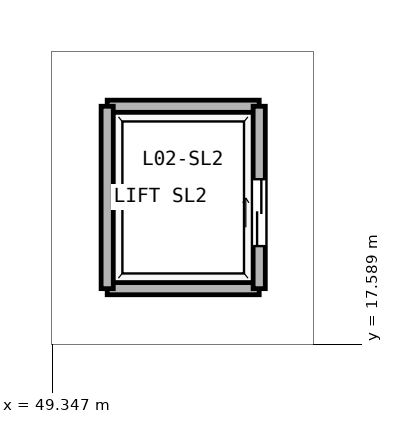
"""IFC4 building model, lengths in metres.
Left out: names, types, materials, properties, quantities, classifications, styles, units other than length and angle.
Written with IfcOpenShell. Run it as: python <this file> out.ifc"""

import sys

from ifc_helpers import new_model, si_unit, direction, frame, frame_2d, origin, place, context, subcontext, project, spatial, rectangle, extrude, element, fill, save


model = new_model("IFC4")
c1 = context("Model", 3, precision=1e-05, world=origin(), true_north=direction((0.0, 1.0)))
c2 = subcontext(c1, "Body", "Model", "MODEL_VIEW")
j1 = project(units=[si_unit("LENGTHUNIT", "METRE"), si_unit("PLANEANGLEUNIT", "RADIAN")], contexts=[c1])
p1 = place(None, origin())
s1 = spatial("IfcSite", under=j1, at=p1, CompositionType="ELEMENT")
p2 = place(p1, origin())
s2 = spatial("IfcBuilding", under=s1, at=p2, CompositionType="ELEMENT")
p3 = place(p2, frame((0.0, 0.0, 9.0)))
s3 = spatial("IfcBuildingStorey", under=s2, at=p3, CompositionType="ELEMENT", Elevation=9.0)
for number, where, z_axis, x_axis in (
    (1, (50.25, 18.5, 0.0), (0.0, 0.0, 1.0), (1.0, 0.0, 0.0)),
    (2, (50.25, 21.5, 0.0), (0.0, 0.0, 1.0), (1.0, 0.0, 0.0)),
):
    element("IfcWall", number, at=place(p3, frame(where, z_axis=z_axis, x_axis=x_axis)), inside=s3, PredefinedType="PARTITIONING", context=c2, shape_type="SweptSolid", body=[
        extrude(rectangle(XDim=2.5, YDim=0.2, at=frame_2d((1.25, 0.0))), origin(), (0.0, 0.0, 1.0), 4.18),
    ])
p4 = place(p3, frame((50.25, 18.5, 0.0), z_axis=(0.0, 0.0, 1.0), x_axis=(0.0, 1.0, 0.0)))
e3 = element("IfcWall", 3, at=p4, inside=s3, PredefinedType="PARTITIONING", context=c2, shape_type="SweptSolid", body=[
    extrude(rectangle(XDim=3.0, YDim=0.2, at=frame_2d((1.5, 0.0))), origin(), (0.0, 0.0, 1.0), 4.18),
])
p5 = place(p3, frame((52.75, 18.5, 0.0), z_axis=(0.0, 0.0, 1.0), x_axis=(0.0, 1.0, 0.0)))
e4 = element("IfcWall", 4, at=p5, inside=s3, PredefinedType="PARTITIONING", context=c2, shape_type="SweptSolid", body=[
    extrude(rectangle(XDim=3.0, YDim=0.2, at=frame_2d((1.5, 0.0))), origin(), (0.0, 0.0, 1.0), 4.18),
])
p6 = place(p5, frame((0.7, 0.0, 0.0)))
e5 = element("IfcOpeningElement", 5, at=p6, cuts=e4, PredefinedType="OPENING", context=c2, shape_type="SweptSolid", body=[
    extrude(rectangle(XDim=1.1, YDim=2.25, at=frame_2d((0.55, 1.125))), frame((0.0, 0.11, 0.0), z_axis=(0.0, -1.0, 0.0), x_axis=(1.0, 0.0, 0.0)), (0.0, 0.0, 1.0), 0.22),
])
p7 = place(p6, origin())
e6 = element("IfcDoor", 6, at=p7, inside=s3, OperationType="DOUBLE_DOOR_SLIDING", PredefinedType="DOOR", context=c2, shape_type="SweptSolid", body=[
    extrude(rectangle(XDim=1.1, YDim=2.25, at=frame_2d((0.55, 1.125))), frame((0.0, 0.025, 0.0), z_axis=(0.0, -1.0, 0.0), x_axis=(1.0, 0.0, 0.0)), (0.0, 0.0, 1.0), 0.05),
])
fill(e5, e6)
save(model, sys.argv[1])
